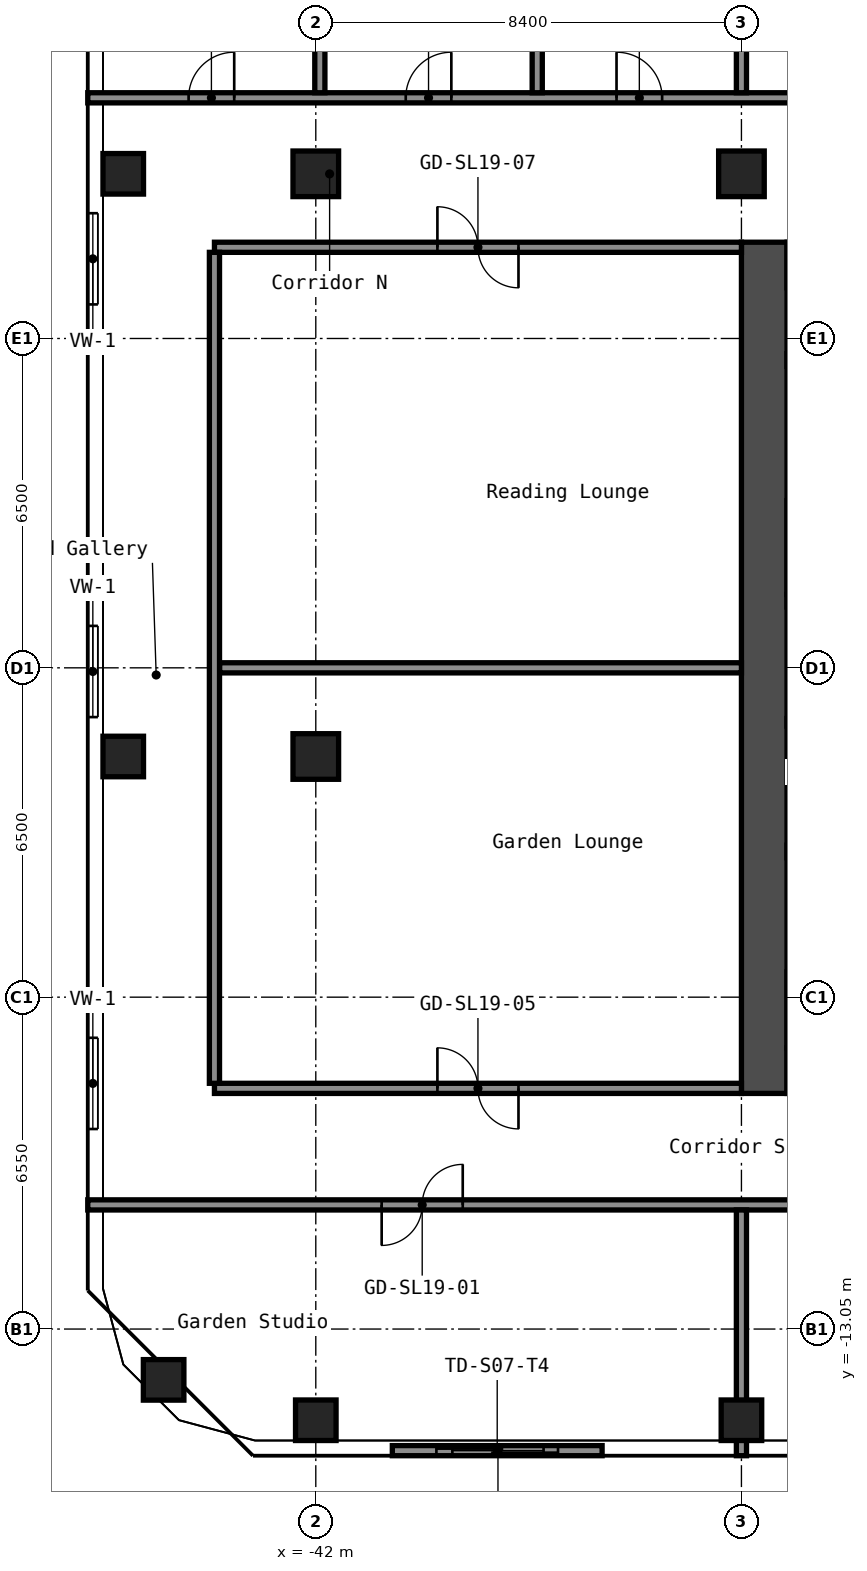
"""IFC4 building model, lengths in metres.
Left out: names, types, materials, properties, quantities, classifications, styles, units other than length and angle.
Written with IfcOpenShell. Run it as: python <this file> out.ifc"""

import sys

from ifc_helpers import new_model, si_unit, direction, frame, frame_2d, origin, origin_2d, place, context, subcontext, project, spatial, rectangle, hollow_rectangle, extrude, element, fill, save


model = new_model("IFC4")
c1 = context("Model", 3, precision=1e-05, world=origin(), true_north=direction((0.0, 1.0)))
c2 = subcontext(c1, "Body", "Model", "MODEL_VIEW")
j1 = project(units=[si_unit("LENGTHUNIT", "METRE"), si_unit("PLANEANGLEUNIT", "RADIAN")], contexts=[c1])
p1 = place(None, origin())
s1 = spatial("IfcSite", under=j1, at=p1, CompositionType="ELEMENT")
p2 = place(p1, origin())
s2 = spatial("IfcBuilding", under=s1, at=p2, CompositionType="ELEMENT")
p3 = place(p2, frame((0.0, 0.0, 69.0)))
s3 = spatial("IfcBuildingStorey", under=s2, at=p3, CompositionType="ELEMENT", Elevation=69.0)
for number, where, z_axis, x_axis in (
    (1, (-45.003, -14.053, 0.0), (0.0, 0.0, 1.0), (1.0, 0.0, 0.0)),
    (2, (-45.8, -1.75, 0.0), (0.0, 0.0, 1.0), (1.0, 0.0, 0.0)),
    (3, (-45.8, 9.75, 0.0), (0.0, 0.0, 1.0), (1.0, 0.0, 0.0)),
    (4, (-42.0, -14.85, 0.0), (0.0, 0.0, 1.0), (1.0, 0.0, 0.0)),
):
    element("IfcColumn", number, at=place(p3, frame(where, z_axis=z_axis, x_axis=x_axis)), inside=s3, PredefinedType="COLUMN", context=c2, shape_type="SweptSolid", body=[
        extrude(hollow_rectangle(XDim=0.8, YDim=0.8, WallThickness=0.032, at=origin_2d()), origin(), (0.0, 0.0, 1.0), 6.0),
    ])
for number, where, z_axis, x_axis in (
    (5, (-42.0, -1.75, 0.0), (0.0, 0.0, 1.0), (1.0, 0.0, 0.0)),
    (6, (-42.0, 9.75, 0.0), (0.0, 0.0, 1.0), (1.0, 0.0, 0.0)),
):
    element("IfcColumn", number, at=place(p3, frame(where, z_axis=z_axis, x_axis=x_axis)), inside=s3, PredefinedType="COLUMN", context=c2, shape_type="SweptSolid", body=[
        extrude(hollow_rectangle(XDim=0.9, YDim=0.9, WallThickness=0.036, at=origin_2d()), origin(), (0.0, 0.0, 1.0), 6.0),
    ])
p4 = place(p3, frame((-33.6, -14.85, 0.0), z_axis=(0.0, 0.0, 1.0), x_axis=(1.0, 0.0, 0.0)))
e7 = element("IfcColumn", 7, at=p4, inside=s3, PredefinedType="COLUMN", context=c2, shape_type="SweptSolid", body=[
    extrude(hollow_rectangle(XDim=0.8, YDim=0.8, WallThickness=0.032, at=origin_2d()), origin(), (0.0, 0.0, 1.0), 6.0),
])
p5 = place(p3, frame((-33.6, 9.75, 0.0), z_axis=(0.0, 0.0, 1.0), x_axis=(1.0, 0.0, 0.0)))
e8 = element("IfcColumn", 8, at=p5, inside=s3, PredefinedType="COLUMN", context=c2, shape_type="SweptSolid", body=[
    extrude(hollow_rectangle(XDim=0.9, YDim=0.9, WallThickness=0.036, at=origin_2d()), origin(), (0.0, 0.0, 1.0), 6.0),
])
p6 = place(p3, frame((-33.15, -8.4, 0.0), z_axis=(0.0, 0.0, 1.0), x_axis=(0.0, 1.0, 0.0)))
e9 = element("IfcWall", 9, at=p6, inside=s3, PredefinedType="SHEAR", context=c2, shape_type="SweptSolid", body=[
    extrude(rectangle(XDim=16.8, YDim=0.9, at=frame_2d((8.4, 0.0))), origin(), (0.0, 0.0, 1.0), 6.0),
])
p7 = place(p3, frame((-32.7, 1.325, 0.0), z_axis=(0.0, 0.0, 1.0), x_axis=(1.0, 0.0, 0.0)))
e10 = element("IfcWall", 10, at=p7, inside=s3, PredefinedType="SHEAR", context=c2, shape_type="SweptSolid", body=[
    extrude(rectangle(XDim=5.05, YDim=0.25, at=frame_2d((2.525, 0.0))), origin(), (0.0, 0.0, 1.0), 6.0),
])
p8 = place(p7, frame((3.3, 0.0, 0.0)))
e11 = element("IfcOpeningElement", 11, at=p8, cuts=e10, PredefinedType="OPENING", context=c2, shape_type="SweptSolid", body=[
    extrude(rectangle(XDim=1.2, YDim=2.1, at=frame_2d((0.6, 1.05))), frame((0.0, 0.135, 0.0), z_axis=(0.0, -1.0, 0.0), x_axis=(1.0, 0.0, 0.0)), (0.0, 0.0, 1.0), 0.27),
])
p9 = place(p3, frame((-32.7, -3.625, 0.0), z_axis=(0.0, 0.0, 1.0), x_axis=(1.0, 0.0, 0.0)))
e12 = element("IfcWall", 12, at=p9, inside=s3, PredefinedType="SHEAR", context=c2, shape_type="SweptSolid", body=[
    extrude(rectangle(XDim=4.55, YDim=0.25, at=frame_2d((2.275, 0.0))), origin(), (0.0, 0.0, 1.0), 6.0),
])
p10 = place(p9, frame((2.85, 0.0, 0.0)))
e13 = element("IfcOpeningElement", 13, at=p10, cuts=e12, PredefinedType="OPENING", context=c2, shape_type="SweptSolid", body=[
    extrude(rectangle(XDim=1.1, YDim=2.1, at=frame_2d((0.55, 1.05))), frame((0.0, 0.135, 0.0), z_axis=(0.0, -1.0, 0.0), x_axis=(1.0, 0.0, 0.0)), (0.0, 0.0, 1.0), 0.27),
])
p11 = place(p9, frame((0.6, 0.0, 0.0)))
e14 = element("IfcOpeningElement", 14, at=p11, cuts=e12, PredefinedType="OPENING", context=c2, shape_type="SweptSolid", body=[
    extrude(rectangle(XDim=1.1, YDim=2.1, at=frame_2d((0.55, 1.05))), frame((0.0, 0.135, 0.0), z_axis=(0.0, -1.0, 0.0), x_axis=(1.0, 0.0, 0.0)), (0.0, 0.0, 1.0), 0.27),
])
p12 = place(p3, frame((-32.7, -6.75, 0.0), z_axis=(0.0, 0.0, 1.0), x_axis=(1.0, 0.0, 0.0)))
e15 = element("IfcWall", 15, at=p12, inside=s3, PredefinedType="SHEAR", context=c2, shape_type="SweptSolid", body=[
    extrude(rectangle(XDim=4.55, YDim=1.5, at=frame_2d((2.275, 0.0))), origin(), (0.0, 0.0, 1.0), 6.0),
])
p13 = place(p3, frame((-46.5, -10.6, 0.0), z_axis=(0.0, 0.0, 1.0), x_axis=(1.0, 0.0, 0.0)))
e16 = element("IfcWall", 16, at=p13, inside=s3, PredefinedType="PARTITIONING", context=c2, shape_type="SweptSolid", body=[
    extrude(rectangle(XDim=29.7, YDim=0.2, at=frame_2d((14.85, 0.0))), origin(), (0.0, 0.0, 1.0), 6.0),
])
p14 = place(p13, frame((5.8, 0.0, 0.0)))
e17 = element("IfcOpeningElement", 17, at=p14, cuts=e16, PredefinedType="OPENING", context=c2, shape_type="SweptSolid", body=[
    extrude(rectangle(XDim=1.6, YDim=2.1, at=frame_2d((0.8, 1.05))), frame((0.0, 0.11, 0.0), z_axis=(0.0, -1.0, 0.0), x_axis=(1.0, 0.0, 0.0)), (0.0, 0.0, 1.0), 0.22),
])
p15 = place(p13, frame((22.6, 0.0, 0.0)))
e18 = element("IfcOpeningElement", 18, at=p15, cuts=e16, PredefinedType="OPENING", context=c2, shape_type="SweptSolid", body=[
    extrude(rectangle(XDim=1.6, YDim=2.1, at=frame_2d((0.8, 1.05))), frame((0.0, 0.11, 0.0), z_axis=(0.0, -1.0, 0.0), x_axis=(1.0, 0.0, 0.0)), (0.0, 0.0, 1.0), 0.22),
])
p16 = place(p3, frame((-44.0, -8.3, 0.0), z_axis=(0.0, 0.0, 1.0), x_axis=(1.0, 0.0, 0.0)))
e19 = element("IfcWall", 19, at=p16, inside=s3, PredefinedType="PARTITIONING", context=c2, shape_type="SweptSolid", body=[
    extrude(rectangle(XDim=10.4, YDim=0.2, at=frame_2d((5.2, 0.0))), origin(), (0.0, 0.0, 1.0), 6.0),
])
p17 = place(p16, frame((4.4, 0.0, 0.0)))
e20 = element("IfcOpeningElement", 20, at=p17, cuts=e19, PredefinedType="OPENING", context=c2, shape_type="SweptSolid", body=[
    extrude(rectangle(XDim=1.6, YDim=2.1, at=frame_2d((0.8, 1.05))), frame((0.0, 0.11, 0.0), z_axis=(0.0, -1.0, 0.0), x_axis=(1.0, 0.0, 0.0)), (0.0, 0.0, 1.0), 0.22),
])
p18 = place(p3, frame((-43.9, 0.0, 0.0), z_axis=(0.0, 0.0, 1.0), x_axis=(1.0, 0.0, 0.0)))
e21 = element("IfcWall", 21, at=p18, inside=s3, PredefinedType="PARTITIONING", context=c2, shape_type="SweptSolid", body=[
    extrude(rectangle(XDim=10.3, YDim=0.2, at=frame_2d((5.15, 0.0))), origin(), (0.0, 0.0, 1.0), 6.0),
])
p19 = place(p3, frame((-44.0, 8.3, 0.0), z_axis=(0.0, 0.0, 1.0), x_axis=(1.0, 0.0, 0.0)))
e22 = element("IfcWall", 22, at=p19, inside=s3, PredefinedType="PARTITIONING", context=c2, shape_type="SweptSolid", body=[
    extrude(rectangle(XDim=10.4, YDim=0.2, at=frame_2d((5.2, 0.0))), origin(), (0.0, 0.0, 1.0), 6.0),
])
p20 = place(p19, frame((4.4, 0.0, 0.0)))
e23 = element("IfcOpeningElement", 23, at=p20, cuts=e22, PredefinedType="OPENING", context=c2, shape_type="SweptSolid", body=[
    extrude(rectangle(XDim=1.6, YDim=2.1, at=frame_2d((0.8, 1.05))), frame((0.0, 0.11, 0.0), z_axis=(0.0, -1.0, 0.0), x_axis=(1.0, 0.0, 0.0)), (0.0, 0.0, 1.0), 0.22),
])
p21 = place(p3, frame((-46.5, 11.25, 0.0), z_axis=(0.0, 0.0, 1.0), x_axis=(1.0, 0.0, 0.0)))
e24 = element("IfcWall", 24, at=p21, inside=s3, PredefinedType="PARTITIONING", context=c2, shape_type="SweptSolid", body=[
    extrude(rectangle(XDim=29.7, YDim=0.2, at=frame_2d((14.85, 0.0))), origin(), (0.0, 0.0, 1.0), 6.0),
])
p22 = place(p21, frame((1.99, 0.0, 0.0)))
e25 = element("IfcOpeningElement", 25, at=p22, cuts=e24, PredefinedType="OPENING", context=c2, shape_type="SweptSolid", body=[
    extrude(rectangle(XDim=0.9, YDim=2.1, at=frame_2d((0.45, 1.05))), frame((0.0, 0.11, 0.0), z_axis=(0.0, -1.0, 0.0), x_axis=(1.0, 0.0, 0.0)), (0.0, 0.0, 1.0), 0.22),
])
p23 = place(p21, frame((6.275, 0.0, 0.0)))
e26 = element("IfcOpeningElement", 26, at=p23, cuts=e24, PredefinedType="OPENING", context=c2, shape_type="SweptSolid", body=[
    extrude(rectangle(XDim=0.9, YDim=2.1, at=frame_2d((0.45, 1.05))), frame((0.0, 0.11, 0.0), z_axis=(0.0, -1.0, 0.0), x_axis=(1.0, 0.0, 0.0)), (0.0, 0.0, 1.0), 0.22),
])
p24 = place(p21, frame((10.435, 0.0, 0.0)))
e27 = element("IfcOpeningElement", 27, at=p24, cuts=e24, PredefinedType="OPENING", context=c2, shape_type="SweptSolid", body=[
    extrude(rectangle(XDim=0.9, YDim=2.1, at=frame_2d((0.45, 1.05))), frame((0.0, 0.11, 0.0), z_axis=(0.0, -1.0, 0.0), x_axis=(1.0, 0.0, 0.0)), (0.0, 0.0, 1.0), 0.22),
])
p25 = place(p21, frame((22.6, 0.0, 0.0)))
e28 = element("IfcOpeningElement", 28, at=p25, cuts=e24, PredefinedType="OPENING", context=c2, shape_type="SweptSolid", body=[
    extrude(rectangle(XDim=1.6, YDim=2.1, at=frame_2d((0.8, 1.05))), frame((0.0, 0.11, 0.0), z_axis=(0.0, -1.0, 0.0), x_axis=(1.0, 0.0, 0.0)), (0.0, 0.0, 1.0), 0.22),
])
p26 = place(p3, frame((-44.0, -8.2, 0.0), z_axis=(0.0, 0.0, 1.0), x_axis=(0.0, 1.0, 0.0)))
e29 = element("IfcWall", 29, at=p26, inside=s3, PredefinedType="PARTITIONING", context=c2, shape_type="SweptSolid", body=[
    extrude(rectangle(XDim=16.4, YDim=0.2, at=frame_2d((8.2, 0.0))), origin(), (0.0, 0.0, 1.0), 6.0),
])
for number, where, z_axis, x_axis in (
    (30, (-41.92, 11.35, 0.0), (0.0, 0.0, 1.0), (0.0, 1.0, 0.0)),
    (31, (-37.63, 11.35, 0.0), (0.0, 0.0, 1.0), (0.0, 1.0, 0.0)),
):
    element("IfcWall", number, at=place(p3, frame(where, z_axis=z_axis, x_axis=x_axis)), inside=s3, PredefinedType="PARTITIONING", context=c2, shape_type="SweptSolid", body=[
        extrude(rectangle(XDim=12.2, YDim=0.2, at=frame_2d((6.1, 0.0))), origin(), (0.0, 0.0, 1.0), 6.0),
    ])
p27 = place(p3, frame((-33.6, -15.55, 0.0), z_axis=(0.0, 0.0, 1.0), x_axis=(0.0, 1.0, 0.0)))
e32 = element("IfcWall", 32, at=p27, inside=s3, PredefinedType="PARTITIONING", context=c2, shape_type="SweptSolid", body=[
    extrude(rectangle(XDim=4.85, YDim=0.2, at=frame_2d((2.425, 0.0))), origin(), (0.0, 0.0, 1.0), 6.0),
])
p28 = place(p3, frame((-33.6, 11.35, 0.0), z_axis=(0.0, 0.0, 1.0), x_axis=(0.0, 1.0, 0.0)))
e33 = element("IfcWall", 33, at=p28, inside=s3, PredefinedType="PARTITIONING", context=c2, shape_type="SweptSolid", body=[
    extrude(rectangle(XDim=12.2, YDim=0.2, at=frame_2d((6.1, 0.0))), origin(), (0.0, 0.0, 1.0), 6.0),
])
p29 = place(p3, frame((-46.4, 12.145, 4.45), z_axis=(0.0, 0.0, 1.0), x_axis=(0.0, -1.0, 0.0)))
p30 = place(p29, frame((3.172, 0.0, 0.25)))
p31 = place(p30, origin())
e34 = element("IfcWindow", 34, at=p31, inside=s3, PartitioningType="SINGLE_PANEL", PredefinedType="WINDOW", context=c2, shape_type="SweptSolid", body=[
    extrude(rectangle(XDim=1.8, YDim=0.9, at=frame_2d((0.9, 0.45))), frame((0.0, 0.03, 0.0), z_axis=(0.0, -1.0, 0.0), x_axis=(1.0, 0.0, 0.0)), (0.0, 0.0, 1.0), 0.06),
])
p32 = place(p3, frame((-46.4, 4.0, 4.45), z_axis=(0.0, 0.0, 1.0), x_axis=(0.0, -1.0, 0.0)))
p33 = place(p32, frame((3.172, 0.0, 0.25)))
p34 = place(p33, origin())
e35 = element("IfcWindow", 35, at=p34, inside=s3, PartitioningType="SINGLE_PANEL", PredefinedType="WINDOW", context=c2, shape_type="SweptSolid", body=[
    extrude(rectangle(XDim=1.8, YDim=0.9, at=frame_2d((0.9, 0.45))), frame((0.0, 0.03, 0.0), z_axis=(0.0, -1.0, 0.0), x_axis=(1.0, 0.0, 0.0)), (0.0, 0.0, 1.0), 0.06),
])
p35 = place(p3, frame((-46.4, -4.145, 4.45), z_axis=(0.0, 0.0, 1.0), x_axis=(0.0, -1.0, 0.0)))
p36 = place(p35, frame((3.157, 0.0, 0.25)))
p37 = place(p36, origin())
e36 = element("IfcWindow", 36, at=p37, inside=s3, PartitioningType="SINGLE_PANEL", PredefinedType="WINDOW", context=c2, shape_type="SweptSolid", body=[
    extrude(rectangle(XDim=1.8, YDim=0.9, at=frame_2d((0.9, 0.45))), frame((0.0, 0.03, 0.0), z_axis=(0.0, -1.0, 0.0), x_axis=(1.0, 0.0, 0.0)), (0.0, 0.0, 1.0), 0.06),
])
p38 = place(p3, frame((-43.209, -15.45, 4.45), z_axis=(0.0, 0.0, 1.0), x_axis=(1.0, 0.0, 0.0)))
p39 = place(p38, frame((3.905, 0.0, 0.25)))
p40 = place(p39, origin())
e37 = element("IfcWindow", 37, at=p40, inside=s3, PartitioningType="SINGLE_PANEL", PredefinedType="WINDOW", context=c2, shape_type="SweptSolid", body=[
    extrude(rectangle(XDim=1.8, YDim=0.9, at=frame_2d((0.9, 0.45))), frame((0.0, 0.03, 0.0), z_axis=(0.0, -1.0, 0.0), x_axis=(1.0, 0.0, 0.0)), (0.0, 0.0, 1.0), 0.06),
])
p41 = place(p3, frame((-40.49, -15.45, 0.0), z_axis=(0.0, 0.0, 1.0), x_axis=(1.0, 0.0, 0.0)))
p42 = place(p41, frame((0.87, 0.0, 0.0)))
p43 = place(p42, frame((2.4, 0.0, 0.0), z_axis=(0.0, 0.0, 1.0), x_axis=(-1.0, 0.0, 0.0)))
e38 = element("IfcDoor", 38, at=p43, inside=s3, OperationType="SLIDING_TO_LEFT", PredefinedType="DOOR", context=c2, shape_type="SweptSolid", body=[
    extrude(rectangle(XDim=2.4, YDim=2.2, at=frame_2d((1.2, 1.1))), frame((0.0, 0.025, 0.0), z_axis=(0.0, -1.0, 0.0), x_axis=(1.0, 0.0, 0.0)), (0.0, 0.0, 1.0), 0.05),
])
p44 = place(p14, origin())
e39 = element("IfcDoor", 39, at=p44, inside=s3, OperationType="DOUBLE_DOOR_SINGLE_SWING", PredefinedType="DOOR", context=c2, shape_type="SweptSolid", body=[
    extrude(rectangle(XDim=1.6, YDim=2.1, at=frame_2d((0.8, 1.05))), frame((0.0, 0.025, 0.0), z_axis=(0.0, -1.0, 0.0), x_axis=(1.0, 0.0, 0.0)), (0.0, 0.0, 1.0), 0.05),
])
fill(e17, e39)
p45 = place(p17, origin())
e40 = element("IfcDoor", 40, at=p45, inside=s3, OperationType="DOUBLE_DOOR_SINGLE_SWING", PredefinedType="DOOR", context=c2, shape_type="SweptSolid", body=[
    extrude(rectangle(XDim=1.6, YDim=2.1, at=frame_2d((0.8, 1.05))), frame((0.0, 0.025, 0.0), z_axis=(0.0, -1.0, 0.0), x_axis=(1.0, 0.0, 0.0)), (0.0, 0.0, 1.0), 0.05),
])
fill(e20, e40)
p46 = place(p20, origin())
e41 = element("IfcDoor", 41, at=p46, inside=s3, OperationType="DOUBLE_DOOR_SINGLE_SWING", PredefinedType="DOOR", context=c2, shape_type="SweptSolid", body=[
    extrude(rectangle(XDim=1.6, YDim=2.1, at=frame_2d((0.8, 1.05))), frame((0.0, 0.025, 0.0), z_axis=(0.0, -1.0, 0.0), x_axis=(1.0, 0.0, 0.0)), (0.0, 0.0, 1.0), 0.05),
])
fill(e23, e41)
p47 = place(p22, origin())
e42 = element("IfcDoor", 42, at=p47, inside=s3, OperationType="SINGLE_SWING_LEFT", PredefinedType="DOOR", context=c2, shape_type="SweptSolid", body=[
    extrude(rectangle(XDim=0.9, YDim=2.1, at=frame_2d((0.45, 1.05))), frame((0.0, 0.025, 0.0), z_axis=(0.0, -1.0, 0.0), x_axis=(1.0, 0.0, 0.0)), (0.0, 0.0, 1.0), 0.05),
])
fill(e25, e42)
p48 = place(p23, origin())
e43 = element("IfcDoor", 43, at=p48, inside=s3, OperationType="SINGLE_SWING_LEFT", PredefinedType="DOOR", context=c2, shape_type="SweptSolid", body=[
    extrude(rectangle(XDim=0.9, YDim=2.1, at=frame_2d((0.45, 1.05))), frame((0.0, 0.025, 0.0), z_axis=(0.0, -1.0, 0.0), x_axis=(1.0, 0.0, 0.0)), (0.0, 0.0, 1.0), 0.05),
])
fill(e26, e43)
p49 = place(p24, origin())
e44 = element("IfcDoor", 44, at=p49, inside=s3, OperationType="SINGLE_SWING_RIGHT", PredefinedType="DOOR", context=c2, shape_type="SweptSolid", body=[
    extrude(rectangle(XDim=0.9, YDim=2.1, at=frame_2d((0.45, 1.05))), frame((0.0, 0.025, 0.0), z_axis=(0.0, -1.0, 0.0), x_axis=(1.0, 0.0, 0.0)), (0.0, 0.0, 1.0), 0.05),
])
fill(e27, e44)
save(model, sys.argv[1])
